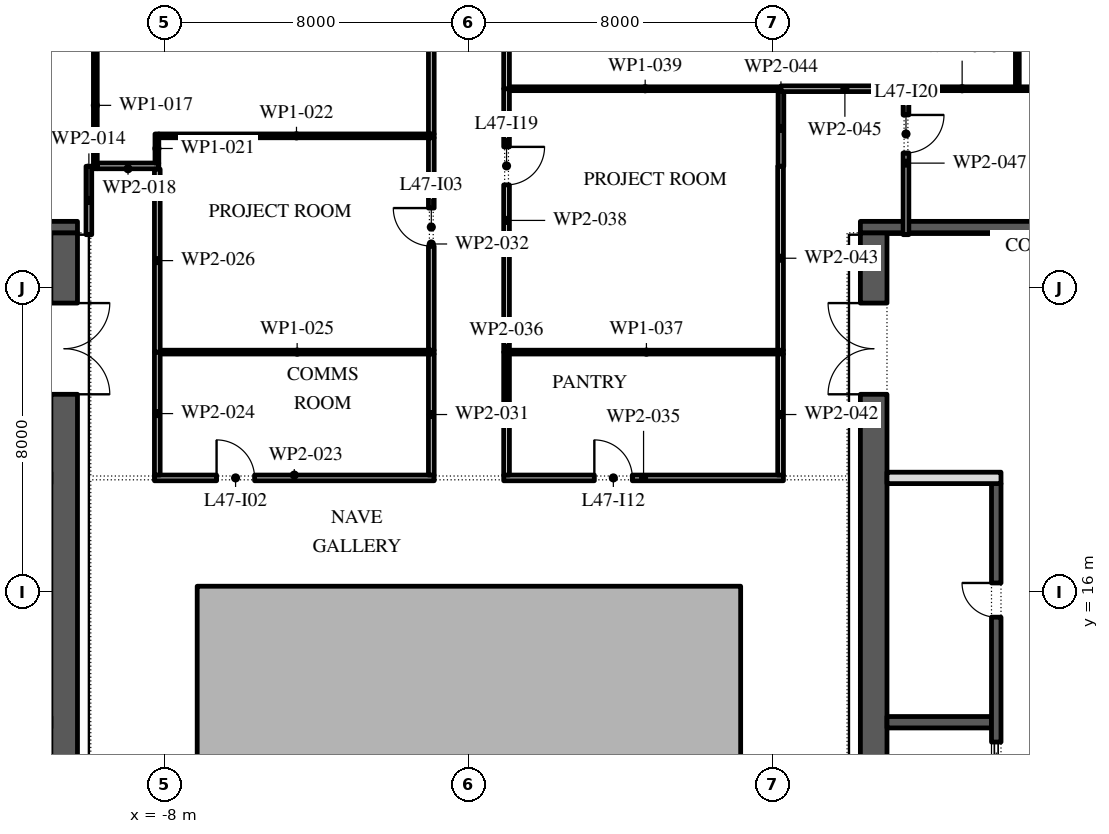
"""IFC4 building model, lengths in metres.
Left out: names, types, materials, properties, quantities, classifications, styles, units other than length and angle.
Written with IfcOpenShell. Run it as: python <this file> out.ifc"""

import sys

from ifc_helpers import new_model, si_unit, direction, frame, frame_2d, origin, place, context, subcontext, project, spatial, polyline, rectangle, outline, extrude, element, fill, save


model = new_model("IFC4")
c1 = context("Model", 3, precision=1e-05, world=origin(), true_north=direction((0.0, 1.0)))
c2 = subcontext(c1, "Body", "Model", "MODEL_VIEW")
j1 = project(units=[si_unit("LENGTHUNIT", "METRE"), si_unit("PLANEANGLEUNIT", "RADIAN")], contexts=[c1])
p1 = place(None, origin())
s1 = spatial("IfcSite", under=j1, at=p1, CompositionType="ELEMENT")
p2 = place(p1, origin())
s2 = spatial("IfcBuilding", under=s1, at=p2, CompositionType="ELEMENT")
p3 = place(p2, frame((0.0, 0.0, 213.6)))
s3 = spatial("IfcBuildingStorey", under=s2, at=p3, CompositionType="ELEMENT", Elevation=213.6)
p4 = place(p3, origin())
e1 = element("IfcWall", 1, at=p4, inside=s3, PredefinedType="STANDARD", context=c2, shape_type="SweptSolid", body=[
    extrude(outline(polyline([(-7.15, -2.15), (7.15, -2.15), (7.15, 16.15), (-7.15, 16.15), (-7.15, -2.15)]), holes=[polyline([(-7.0, -2.0), (-7.0, 16.0), (7.0, 16.0), (7.0, -2.0), (-7.0, -2.0)])]), origin(), (0.0, 0.0, 1.0), 4.0),
])
p5 = place(p3, frame((-10.65, -2.45, 0.0), z_axis=(0.0, 0.0, 1.0), x_axis=(0.0, 1.0, 0.0)))
e2 = element("IfcWall", 2, at=p5, inside=s3, PredefinedType="SHEAR", context=c2, shape_type="SweptSolid", body=[
    extrude(rectangle(XDim=27.9, YDim=0.7, at=frame_2d((13.95, 0.0))), origin(), (0.0, 0.0, 1.0), 4.0),
])
p6 = place(p5, frame((23.65, 0.0, 0.0)))
e3 = element("IfcOpeningElement", 3, at=p6, cuts=e2, PredefinedType="OPENING", context=c2, shape_type="SweptSolid", body=[
    extrude(rectangle(XDim=2.4, YDim=2.1, at=frame_2d((1.2, 1.05))), frame((0.0, 0.36, 0.0), z_axis=(0.0, -1.0, 0.0), x_axis=(1.0, 0.0, 0.0)), (0.0, 0.0, 1.0), 0.72),
])
p7 = place(p5, frame((0.788, 0.0, 0.0)))
e4 = element("IfcOpeningElement", 4, at=p7, cuts=e2, PredefinedType="OPENING", context=c2, shape_type="SweptSolid", body=[
    extrude(rectangle(XDim=0.9, YDim=2.1, at=frame_2d((0.45, 1.05))), frame((0.0, 0.36, 0.0), z_axis=(0.0, -1.0, 0.0), x_axis=(1.0, 0.0, 0.0)), (0.0, 0.0, 1.0), 0.72),
])
p8 = place(p5, frame((3.962, 0.0, 0.0)))
e5 = element("IfcOpeningElement", 5, at=p8, cuts=e2, PredefinedType="OPENING", context=c2, shape_type="SweptSolid", body=[
    extrude(rectangle(XDim=1.0, YDim=2.1, at=frame_2d((0.5, 1.05))), frame((0.0, 0.36, 0.0), z_axis=(0.0, -1.0, 0.0), x_axis=(1.0, 0.0, 0.0)), (0.0, 0.0, 1.0), 0.72),
])
p9 = place(p3, frame((-21.7, 25.6, 0.0), z_axis=(0.0, 0.0, 1.0), x_axis=(1.0, 0.0, 0.0)))
e6 = element("IfcWall", 6, at=p9, inside=s3, PredefinedType="SHEAR", context=c2, shape_type="SweptSolid", body=[
    extrude(rectangle(XDim=11.4, YDim=0.3, at=frame_2d((5.7, 0.0))), origin(), (0.0, 0.0, 1.0), 4.0),
])
p10 = place(p3, frame((10.65, -2.45, 0.0), z_axis=(0.0, 0.0, 1.0), x_axis=(0.0, 1.0, 0.0)))
e7 = element("IfcWall", 7, at=p10, inside=s3, PredefinedType="SHEAR", context=c2, shape_type="SweptSolid", body=[
    extrude(rectangle(XDim=27.9, YDim=0.7, at=frame_2d((13.95, 0.0))), origin(), (0.0, 0.0, 1.0), 4.0),
])
p11 = place(p10, frame((23.65, 0.0, 0.0)))
e8 = element("IfcOpeningElement", 8, at=p11, cuts=e7, PredefinedType="OPENING", context=c2, shape_type="SweptSolid", body=[
    extrude(rectangle(XDim=2.4, YDim=2.1, at=frame_2d((1.2, 1.05))), frame((0.0, 0.36, 0.0), z_axis=(0.0, -1.0, 0.0), x_axis=(1.0, 0.0, 0.0)), (0.0, 0.0, 1.0), 0.72),
])
p12 = place(p10, frame((1.387, 0.0, 0.0)))
e9 = element("IfcOpeningElement", 9, at=p12, cuts=e7, PredefinedType="OPENING", context=c2, shape_type="SweptSolid", body=[
    extrude(rectangle(XDim=0.9, YDim=2.1, at=frame_2d((0.45, 1.05))), frame((0.0, 0.36, 0.0), z_axis=(0.0, -1.0, 0.0), x_axis=(1.0, 0.0, 0.0)), (0.0, 0.0, 1.0), 0.72),
])
p13 = place(p10, frame((4.562, 0.0, 0.0)))
e10 = element("IfcOpeningElement", 10, at=p13, cuts=e7, PredefinedType="OPENING", context=c2, shape_type="SweptSolid", body=[
    extrude(rectangle(XDim=1.0, YDim=2.1, at=frame_2d((0.5, 1.05))), frame((0.0, 0.36, 0.0), z_axis=(0.0, -1.0, 0.0), x_axis=(1.0, 0.0, 0.0)), (0.0, 0.0, 1.0), 0.72),
])
p14 = place(p3, frame((10.3, 25.6, 0.0), z_axis=(0.0, 0.0, 1.0), x_axis=(1.0, 0.0, 0.0)))
e11 = element("IfcWall", 11, at=p14, inside=s3, PredefinedType="SHEAR", context=c2, shape_type="SweptSolid", body=[
    extrude(rectangle(XDim=11.4, YDim=0.3, at=frame_2d((5.7, 0.0))), origin(), (0.0, 0.0, 1.0), 4.0),
])
p15 = place(p3, frame((11.0, 12.571, 0.0), z_axis=(0.0, 0.0, 1.0), x_axis=(1.0, 0.0, 0.0)))
e12 = element("IfcWall", 12, at=p15, inside=s3, PredefinedType="SHEAR", context=c2, shape_type="SweptSolid", body=[
    extrude(rectangle(XDim=2.75, YDim=0.3, at=frame_2d((1.375, 0.0))), origin(), (0.0, 0.0, 1.0), 4.0),
])
p16 = place(p3, frame((13.875, -2.45, 0.0), z_axis=(0.0, 0.0, 1.0), x_axis=(0.0, 1.0, 0.0)))
e13 = element("IfcWall", 13, at=p16, inside=s3, PredefinedType="SHEAR", context=c2, shape_type="SweptSolid", body=[
    extrude(rectangle(XDim=21.3, YDim=0.25, at=frame_2d((10.65, 0.0))), origin(), (0.0, 0.0, 1.0), 4.0),
])
p17 = place(p16, frame((17.786, 0.0, 0.0)))
e14 = element("IfcOpeningElement", 14, at=p17, cuts=e13, PredefinedType="OPENING", context=c2, shape_type="SweptSolid", body=[
    extrude(rectangle(XDim=0.9, YDim=2.1, at=frame_2d((0.45, 1.05))), frame((0.0, 0.135, 0.0), z_axis=(0.0, -1.0, 0.0), x_axis=(1.0, 0.0, 0.0)), (0.0, 0.0, 1.0), 0.27),
])
p18 = place(p16, frame((6.971, 0.0, 0.0)))
e15 = element("IfcOpeningElement", 15, at=p18, cuts=e13, PredefinedType="OPENING", context=c2, shape_type="SweptSolid", body=[
    extrude(rectangle(XDim=1.1, YDim=2.1, at=frame_2d((0.55, 1.05))), frame((0.0, 0.135, 0.0), z_axis=(0.0, -1.0, 0.0), x_axis=(1.0, 0.0, 0.0)), (0.0, 0.0, 1.0), 0.27),
])
p19 = place(p16, frame((9.114, 0.0, 0.0)))
e16 = element("IfcOpeningElement", 16, at=p19, cuts=e13, PredefinedType="OPENING", context=c2, shape_type="SweptSolid", body=[
    extrude(rectangle(XDim=1.1, YDim=2.1, at=frame_2d((0.55, 1.05))), frame((0.0, 0.135, 0.0), z_axis=(0.0, -1.0, 0.0), x_axis=(1.0, 0.0, 0.0)), (0.0, 0.0, 1.0), 0.27),
])
p20 = place(p16, frame((11.257, 0.0, 0.0)))
e17 = element("IfcOpeningElement", 17, at=p20, cuts=e13, PredefinedType="OPENING", context=c2, shape_type="SweptSolid", body=[
    extrude(rectangle(XDim=1.1, YDim=2.1, at=frame_2d((0.55, 1.05))), frame((0.0, 0.135, 0.0), z_axis=(0.0, -1.0, 0.0), x_axis=(1.0, 0.0, 0.0)), (0.0, 0.0, 1.0), 0.27),
])
p21 = place(p16, frame((13.4, 0.0, 0.0)))
e18 = element("IfcOpeningElement", 18, at=p21, cuts=e13, PredefinedType="OPENING", context=c2, shape_type="SweptSolid", body=[
    extrude(rectangle(XDim=1.1, YDim=2.1, at=frame_2d((0.55, 1.05))), frame((0.0, 0.135, 0.0), z_axis=(0.0, -1.0, 0.0), x_axis=(1.0, 0.0, 0.0)), (0.0, 0.0, 1.0), 0.27),
])
p22 = place(p3, frame((11.0, 19.0, 0.0), z_axis=(0.0, 0.0, 1.0), x_axis=(1.0, 0.0, 0.0)))
e19 = element("IfcWall", 19, at=p22, inside=s3, PredefinedType="PARTITIONING", context=c2, shape_type="SweptSolid", body=[
    extrude(rectangle(XDim=3.0, YDim=0.3, at=frame_2d((1.5, 0.0))), origin(), (0.0, 0.0, 1.0), 4.0),
])
p23 = place(p3, frame((-10.0, 25.4, 0.0), z_axis=(0.0, 0.0, 1.0), x_axis=(0.0, 1.0, 0.0)))
e20 = element("IfcWall", 20, at=p23, inside=s3, PredefinedType="PARTITIONING", context=c2, shape_type="SweptSolid", body=[
    extrude(rectangle(XDim=1.8, YDim=0.15, at=frame_2d((0.9, 0.0))), origin(), (0.0, 0.0, 1.0), 4.0),
])
p24 = place(p3, frame((-9.83, 27.135, 0.0), z_axis=(0.0, 0.0, 1.0), x_axis=(0.0, 1.0, 0.0)))
e21 = element("IfcWall", 21, at=p24, inside=s3, PredefinedType="PARTITIONING", context=c2, shape_type="SweptSolid", body=[
    extrude(rectangle(XDim=3.335, YDim=0.1, at=frame_2d((1.667, 0.0))), origin(), (0.0, 0.0, 1.0), 4.0),
])
p25 = place(p3, frame((-9.78, 27.21, 0.0), z_axis=(0.0, 0.0, 1.0), x_axis=(1.0, 0.0, 0.0)))
e22 = element("IfcWall", 22, at=p25, inside=s3, PredefinedType="PARTITIONING", context=c2, shape_type="SweptSolid", body=[
    extrude(rectangle(XDim=1.62, YDim=0.15, at=frame_2d((0.81, 0.0))), origin(), (0.0, 0.0, 1.0), 4.0),
])
p26 = place(p3, frame((-8.21, 27.285, 0.0), z_axis=(0.0, 0.0, 1.0), x_axis=(0.0, 1.0, 0.0)))
e23 = element("IfcWall", 23, at=p26, inside=s3, PredefinedType="PARTITIONING", context=c2, shape_type="SweptSolid", body=[
    extrude(rectangle(XDim=0.765, YDim=0.1, at=frame_2d((0.383, 0.0))), origin(), (0.0, 0.0, 1.0), 4.0),
])
p27 = place(p3, frame((-8.16, 28.0, 0.0), z_axis=(0.0, 0.0, 1.0), x_axis=(1.0, 0.0, 0.0)))
e24 = element("IfcWall", 24, at=p27, inside=s3, PredefinedType="PARTITIONING", context=c2, shape_type="SweptSolid", body=[
    extrude(rectangle(XDim=7.245, YDim=0.1, at=frame_2d((3.623, 0.0))), origin(), (0.0, 0.0, 1.0), 4.0),
])
p28 = place(p3, frame((-8.275, 19.0, 0.0), z_axis=(0.0, 0.0, 1.0), x_axis=(1.0, 0.0, 0.0)))
e25 = element("IfcWall", 25, at=p28, inside=s3, PredefinedType="PARTITIONING", context=c2, shape_type="SweptSolid", body=[
    extrude(rectangle(XDim=7.36, YDim=0.15, at=frame_2d((3.68, 0.0))), origin(), (0.0, 0.0, 1.0), 4.0),
])
p29 = place(p28, frame((1.635, 0.0, 0.0)))
e26 = element("IfcOpeningElement", 26, at=p29, cuts=e25, PredefinedType="OPENING", context=c2, shape_type="SweptSolid", body=[
    extrude(rectangle(XDim=1.0, YDim=2.1, at=frame_2d((0.5, 1.05))), frame((0.0, 0.085, 0.0), z_axis=(0.0, -1.0, 0.0), x_axis=(1.0, 0.0, 0.0)), (0.0, 0.0, 1.0), 0.17),
])
p30 = place(p3, frame((-8.2, 22.31, 0.0), z_axis=(0.0, 0.0, 1.0), x_axis=(0.0, -1.0, 0.0)))
e27 = element("IfcWall", 27, at=p30, inside=s3, PredefinedType="PARTITIONING", context=c2, shape_type="SweptSolid", body=[
    extrude(rectangle(XDim=3.235, YDim=0.15, at=frame_2d((1.618, 0.0))), origin(), (0.0, 0.0, 1.0), 4.0),
])
p31 = place(p3, frame((-8.125, 22.31, 0.0), z_axis=(0.0, 0.0, 1.0), x_axis=(1.0, 0.0, 0.0)))
e28 = element("IfcWall", 28, at=p31, inside=s3, PredefinedType="PARTITIONING", context=c2, shape_type="SweptSolid", body=[
    extrude(rectangle(XDim=7.21, YDim=0.1, at=frame_2d((3.605, 0.0))), origin(), (0.0, 0.0, 1.0), 4.0),
])
p32 = place(p3, frame((-8.2, 27.125, 0.0), z_axis=(0.0, 0.0, 1.0), x_axis=(0.0, -1.0, 0.0)))
e29 = element("IfcWall", 29, at=p32, inside=s3, PredefinedType="PARTITIONING", context=c2, shape_type="SweptSolid", body=[
    extrude(rectangle(XDim=4.815, YDim=0.15, at=frame_2d((2.407, 0.0))), origin(), (0.0, 0.0, 1.0), 4.0),
])
p33 = place(p3, frame((-0.99, 19.075, 0.0), z_axis=(0.0, 0.0, 1.0), x_axis=(0.0, 1.0, 0.0)))
e30 = element("IfcWall", 30, at=p33, inside=s3, PredefinedType="PARTITIONING", context=c2, shape_type="SweptSolid", body=[
    extrude(rectangle(XDim=3.185, YDim=0.15, at=frame_2d((1.593, 0.0))), origin(), (0.0, 0.0, 1.0), 4.0),
])
p34 = place(p3, frame((-0.99, 22.36, 0.0), z_axis=(0.0, 0.0, 1.0), x_axis=(0.0, 1.0, 0.0)))
e31 = element("IfcWall", 31, at=p34, inside=s3, PredefinedType="PARTITIONING", context=c2, shape_type="SweptSolid", body=[
    extrude(rectangle(XDim=5.59, YDim=0.15, at=frame_2d((2.795, 0.0))), origin(), (0.0, 0.0, 1.0), 4.0),
])
p35 = place(p34, frame((2.74, 0.0, 0.0)))
e32 = element("IfcOpeningElement", 32, at=p35, cuts=e31, PredefinedType="OPENING", context=c2, shape_type="SweptSolid", body=[
    extrude(rectangle(XDim=1.0, YDim=2.1, at=frame_2d((0.5, 1.05))), frame((0.0, 0.085, 0.0), z_axis=(0.0, -1.0, 0.0), x_axis=(1.0, 0.0, 0.0)), (0.0, 0.0, 1.0), 0.17),
])
p36 = place(p3, frame((-0.99, 28.05, 0.0), z_axis=(0.0, 0.0, 1.0), x_axis=(0.0, 1.0, 0.0)))
e33 = element("IfcWall", 33, at=p36, inside=s3, PredefinedType="PARTITIONING", context=c2, shape_type="SweptSolid", body=[
    extrude(rectangle(XDim=13.246, YDim=0.15, at=frame_2d((6.623, 0.0))), origin(), (0.0, 0.0, 1.0), 4.0),
])
p37 = place(p36, frame((6.32, 0.0, 0.0)))
e34 = element("IfcOpeningElement", 34, at=p37, cuts=e33, PredefinedType="OPENING", context=c2, shape_type="SweptSolid", body=[
    extrude(rectangle(XDim=1.0, YDim=2.1, at=frame_2d((0.5, 1.05))), frame((0.0, 0.085, 0.0), z_axis=(0.0, -1.0, 0.0), x_axis=(1.0, 0.0, 0.0)), (0.0, 0.0, 1.0), 0.17),
])
p38 = place(p3, frame((0.915, 19.0, 0.0), z_axis=(0.0, 0.0, 1.0), x_axis=(1.0, 0.0, 0.0)))
e35 = element("IfcWall", 35, at=p38, inside=s3, PredefinedType="PARTITIONING", context=c2, shape_type="SweptSolid", body=[
    extrude(rectangle(XDim=7.36, YDim=0.15, at=frame_2d((3.68, 0.0))), origin(), (0.0, 0.0, 1.0), 4.0),
])
p39 = place(p38, frame((2.385, 0.0, 0.0)))
e36 = element("IfcOpeningElement", 36, at=p39, cuts=e35, PredefinedType="OPENING", context=c2, shape_type="SweptSolid", body=[
    extrude(rectangle(XDim=1.0, YDim=2.1, at=frame_2d((0.5, 1.05))), frame((0.0, 0.085, 0.0), z_axis=(0.0, -1.0, 0.0), x_axis=(1.0, 0.0, 0.0)), (0.0, 0.0, 1.0), 0.17),
])
p40 = place(p3, frame((0.99, 22.31, 0.0), z_axis=(0.0, 0.0, 1.0), x_axis=(0.0, -1.0, 0.0)))
e37 = element("IfcWall", 37, at=p40, inside=s3, PredefinedType="PARTITIONING", context=c2, shape_type="SweptSolid", body=[
    extrude(rectangle(XDim=3.235, YDim=0.15, at=frame_2d((1.618, 0.0))), origin(), (0.0, 0.0, 1.0), 4.0),
])
p41 = place(p3, frame((1.065, 22.31, 0.0), z_axis=(0.0, 0.0, 1.0), x_axis=(1.0, 0.0, 0.0)))
e38 = element("IfcWall", 38, at=p41, inside=s3, PredefinedType="PARTITIONING", context=c2, shape_type="SweptSolid", body=[
    extrude(rectangle(XDim=7.21, YDim=0.1, at=frame_2d((3.605, 0.0))), origin(), (0.0, 0.0, 1.0), 4.0),
])
p42 = place(p3, frame((0.99, 29.24, 0.0), z_axis=(0.0, 0.0, 1.0), x_axis=(0.0, -1.0, 0.0)))
e39 = element("IfcWall", 39, at=p42, inside=s3, PredefinedType="PARTITIONING", context=c2, shape_type="SweptSolid", body=[
    extrude(rectangle(XDim=6.93, YDim=0.15, at=frame_2d((3.465, 0.0))), origin(), (0.0, 0.0, 1.0), 4.0),
])
p43 = place(p42, frame((1.53, 0.0, 0.0)))
e40 = element("IfcOpeningElement", 40, at=p43, cuts=e39, PredefinedType="OPENING", context=c2, shape_type="SweptSolid", body=[
    extrude(rectangle(XDim=1.0, YDim=2.1, at=frame_2d((0.5, 1.05))), frame((0.0, 0.085, 0.0), z_axis=(0.0, -1.0, 0.0), x_axis=(1.0, 0.0, 0.0)), (0.0, 0.0, 1.0), 0.17),
])
p44 = place(p3, frame((1.065, 29.24, 0.0), z_axis=(0.0, 0.0, 1.0), x_axis=(1.0, 0.0, 0.0)))
e41 = element("IfcWall", 41, at=p44, inside=s3, PredefinedType="PARTITIONING", context=c2, shape_type="SweptSolid", body=[
    extrude(rectangle(XDim=7.145, YDim=0.1, at=frame_2d((3.573, 0.0))), origin(), (0.0, 0.0, 1.0), 4.0),
])
p45 = place(p3, frame((0.99, 40.05, 0.0), z_axis=(0.0, 0.0, 1.0), x_axis=(0.0, -1.0, 0.0)))
e42 = element("IfcWall", 42, at=p45, inside=s3, PredefinedType="PARTITIONING", context=c2, shape_type="SweptSolid", body=[
    extrude(rectangle(XDim=10.81, YDim=0.15, at=frame_2d((5.405, 0.0))), origin(), (0.0, 0.0, 1.0), 4.0),
])
p46 = place(p45, frame((5.91, 0.0, 0.0)))
e43 = element("IfcOpeningElement", 43, at=p46, cuts=e42, PredefinedType="OPENING", context=c2, shape_type="SweptSolid", body=[
    extrude(rectangle(XDim=1.0, YDim=2.1, at=frame_2d((0.5, 1.05))), frame((0.0, 0.085, 0.0), z_axis=(0.0, -1.0, 0.0), x_axis=(1.0, 0.0, 0.0)), (0.0, 0.0, 1.0), 0.17),
])
p47 = place(p3, frame((8.2, 19.075, 0.0), z_axis=(0.0, 0.0, 1.0), x_axis=(0.0, 1.0, 0.0)))
e44 = element("IfcWall", 44, at=p47, inside=s3, PredefinedType="PARTITIONING", context=c2, shape_type="SweptSolid", body=[
    extrude(rectangle(XDim=3.185, YDim=0.15, at=frame_2d((1.593, 0.0))), origin(), (0.0, 0.0, 1.0), 4.0),
])
p48 = place(p3, frame((8.2, 22.36, 0.0), z_axis=(0.0, 0.0, 1.0), x_axis=(0.0, 1.0, 0.0)))
e45 = element("IfcWall", 45, at=p48, inside=s3, PredefinedType="PARTITIONING", context=c2, shape_type="SweptSolid", body=[
    extrude(rectangle(XDim=4.84, YDim=0.15, at=frame_2d((2.42, 0.0))), origin(), (0.0, 0.0, 1.0), 4.0),
])
p49 = place(p3, frame((8.21, 27.2, 0.0), z_axis=(0.0, 0.0, 1.0), x_axis=(0.0, 1.0, 0.0)))
e46 = element("IfcWall", 46, at=p49, inside=s3, PredefinedType="PARTITIONING", context=c2, shape_type="SweptSolid", body=[
    extrude(rectangle(XDim=1.99, YDim=0.15, at=frame_2d((0.995, 0.0))), origin(), (0.0, 0.0, 1.0), 4.0),
])
p50 = place(p3, frame((8.21, 29.24, 0.0), z_axis=(0.0, 0.0, 1.0), x_axis=(1.0, 0.0, 0.0)))
e47 = element("IfcWall", 47, at=p50, inside=s3, PredefinedType="PARTITIONING", context=c2, shape_type="SweptSolid", body=[
    extrude(rectangle(XDim=3.365, YDim=0.15, at=frame_2d((1.683, 0.0))), origin(), (0.0, 0.0, 1.0), 4.0),
])
p51 = place(p3, frame((11.5, 29.165, 0.0), z_axis=(0.0, 0.0, 1.0), x_axis=(0.0, -1.0, 0.0)))
e48 = element("IfcWall", 48, at=p51, inside=s3, PredefinedType="PARTITIONING", context=c2, shape_type="SweptSolid", body=[
    extrude(rectangle(XDim=3.765, YDim=0.15, at=frame_2d((1.883, 0.0))), origin(), (0.0, 0.0, 1.0), 4.0),
])
p52 = place(p51, frame((0.615, 0.0, 0.0)))
e49 = element("IfcOpeningElement", 49, at=p52, cuts=e48, PredefinedType="OPENING", context=c2, shape_type="SweptSolid", body=[
    extrude(rectangle(XDim=1.0, YDim=2.1, at=frame_2d((0.5, 1.05))), frame((0.0, 0.085, 0.0), z_axis=(0.0, -1.0, 0.0), x_axis=(1.0, 0.0, 0.0)), (0.0, 0.0, 1.0), 0.17),
])
p53 = place(p3, frame((11.575, 29.24, 0.0), z_axis=(0.0, 0.0, 1.0), x_axis=(1.0, 0.0, 0.0)))
e50 = element("IfcWall", 50, at=p53, inside=s3, PredefinedType="PARTITIONING", context=c2, shape_type="SweptSolid", body=[
    extrude(rectangle(XDim=2.805, YDim=0.1, at=frame_2d((1.402, 0.0))), origin(), (0.0, 0.0, 1.0), 4.0),
])
p54 = place(p3, frame((14.38, 29.24, 0.0), z_axis=(0.0, 0.0, 1.0), x_axis=(1.0, 0.0, 0.0)))
e51 = element("IfcWall", 51, at=p54, inside=s3, PredefinedType="PARTITIONING", context=c2, shape_type="SweptSolid", body=[
    extrude(rectangle(XDim=7.63, YDim=0.1, at=frame_2d((3.815, 0.0))), origin(), (0.0, 0.0, 1.0), 4.0),
])
p55 = place(p54, frame((3.28, 0.0, 0.0)))
e52 = element("IfcOpeningElement", 52, at=p55, cuts=e51, PredefinedType="OPENING", context=c2, shape_type="SweptSolid", body=[
    extrude(rectangle(XDim=0.9, YDim=2.1, at=frame_2d((0.45, 1.05))), frame((0.0, 0.06, 0.0), z_axis=(0.0, -1.0, 0.0), x_axis=(1.0, 0.0, 0.0)), (0.0, 0.0, 1.0), 0.12),
])
p56 = place(p3, frame((14.43, 36.22, 0.0), z_axis=(0.0, 0.0, 1.0), x_axis=(0.0, -1.0, 0.0)))
e53 = element("IfcWall", 53, at=p56, inside=s3, PredefinedType="PARTITIONING", context=c2, shape_type="SweptSolid", body=[
    extrude(rectangle(XDim=6.93, YDim=0.1, at=frame_2d((3.465, 0.0))), origin(), (0.0, 0.0, 1.0), 4.0),
])
p57 = place(p6, frame((2.4, 0.0, 0.0), z_axis=(0.0, 0.0, 1.0), x_axis=(-1.0, 0.0, 0.0)))
e54 = element("IfcDoor", 54, at=p57, inside=s3, OperationType="DOUBLE_DOOR_SINGLE_SWING", PredefinedType="DOOR", context=c2, shape_type="SweptSolid", body=[
    extrude(rectangle(XDim=2.4, YDim=2.1, at=frame_2d((1.2, 1.05))), frame((0.0, 0.025, 0.0), z_axis=(0.0, -1.0, 0.0), x_axis=(1.0, 0.0, 0.0)), (0.0, 0.0, 1.0), 0.05),
])
fill(e3, e54)
p58 = place(p17, origin())
e55 = element("IfcDoor", 55, at=p58, inside=s3, OperationType="SINGLE_SWING_LEFT", PredefinedType="DOOR", context=c2, shape_type="SweptSolid", body=[
    extrude(rectangle(XDim=0.9, YDim=2.1, at=frame_2d((0.45, 1.05))), frame((0.0, 0.125, 0.0), z_axis=(0.0, -1.0, 0.0), x_axis=(1.0, 0.0, 0.0)), (0.0, 0.0, 1.0), 0.05),
])
fill(e14, e55)
p59 = place(p21, origin())
e56 = element("IfcDoor", 56, at=p59, inside=s3, OperationType="SLIDING_TO_LEFT", PredefinedType="DOOR", context=c2, shape_type="SweptSolid", body=[
    extrude(rectangle(XDim=1.1, YDim=2.1, at=frame_2d((0.55, 1.05))), frame((0.0, 0.025, 0.0), z_axis=(0.0, -1.0, 0.0), x_axis=(1.0, 0.0, 0.0)), (0.0, 0.0, 1.0), 0.05),
])
fill(e18, e56)
p60 = place(p11, origin())
e57 = element("IfcDoor", 57, at=p60, inside=s3, OperationType="DOUBLE_DOOR_SINGLE_SWING", PredefinedType="DOOR", context=c2, shape_type="SweptSolid", body=[
    extrude(rectangle(XDim=2.4, YDim=2.1, at=frame_2d((1.2, 1.05))), frame((0.0, 0.025, 0.0), z_axis=(0.0, -1.0, 0.0), x_axis=(1.0, 0.0, 0.0)), (0.0, 0.0, 1.0), 0.05),
])
fill(e8, e57)
p61 = place(p29, origin())
e58 = element("IfcDoor", 58, at=p61, inside=s3, OperationType="SINGLE_SWING_RIGHT", PredefinedType="DOOR", context=c2, shape_type="SweptSolid", body=[
    extrude(rectangle(XDim=1.0, YDim=2.1, at=frame_2d((0.5, 1.05))), frame((0.0, 0.025, 0.0), z_axis=(0.0, -1.0, 0.0), x_axis=(1.0, 0.0, 0.0)), (0.0, 0.0, 1.0), 0.05),
])
fill(e26, e58)
p62 = place(p35, origin())
e59 = element("IfcDoor", 59, at=p62, inside=s3, OperationType="SINGLE_SWING_LEFT", PredefinedType="DOOR", context=c2, shape_type="SweptSolid", body=[
    extrude(rectangle(XDim=1.0, YDim=2.1, at=frame_2d((0.5, 1.05))), frame((0.0, 0.025, 0.0), z_axis=(0.0, -1.0, 0.0), x_axis=(1.0, 0.0, 0.0)), (0.0, 0.0, 1.0), 0.05),
])
fill(e32, e59)
p63 = place(p39, origin())
e60 = element("IfcDoor", 60, at=p63, inside=s3, OperationType="SINGLE_SWING_RIGHT", PredefinedType="DOOR", context=c2, shape_type="SweptSolid", body=[
    extrude(rectangle(XDim=1.0, YDim=2.1, at=frame_2d((0.5, 1.05))), frame((0.0, 0.025, 0.0), z_axis=(0.0, -1.0, 0.0), x_axis=(1.0, 0.0, 0.0)), (0.0, 0.0, 1.0), 0.05),
])
fill(e36, e60)
p64 = place(p43, origin())
e61 = element("IfcDoor", 61, at=p64, inside=s3, OperationType="SINGLE_SWING_RIGHT", PredefinedType="DOOR", context=c2, shape_type="SweptSolid", body=[
    extrude(rectangle(XDim=1.0, YDim=2.1, at=frame_2d((0.5, 1.05))), frame((0.0, 0.025, 0.0), z_axis=(0.0, -1.0, 0.0), x_axis=(1.0, 0.0, 0.0)), (0.0, 0.0, 1.0), 0.05),
])
fill(e40, e61)
p65 = place(p52, origin())
e62 = element("IfcDoor", 62, at=p65, inside=s3, OperationType="SINGLE_SWING_RIGHT", PredefinedType="DOOR", context=c2, shape_type="SweptSolid", body=[
    extrude(rectangle(XDim=1.0, YDim=2.1, at=frame_2d((0.5, 1.05))), frame((0.0, 0.025, 0.0), z_axis=(0.0, -1.0, 0.0), x_axis=(1.0, 0.0, 0.0)), (0.0, 0.0, 1.0), 0.05),
])
fill(e49, e62)
save(model, sys.argv[1])
